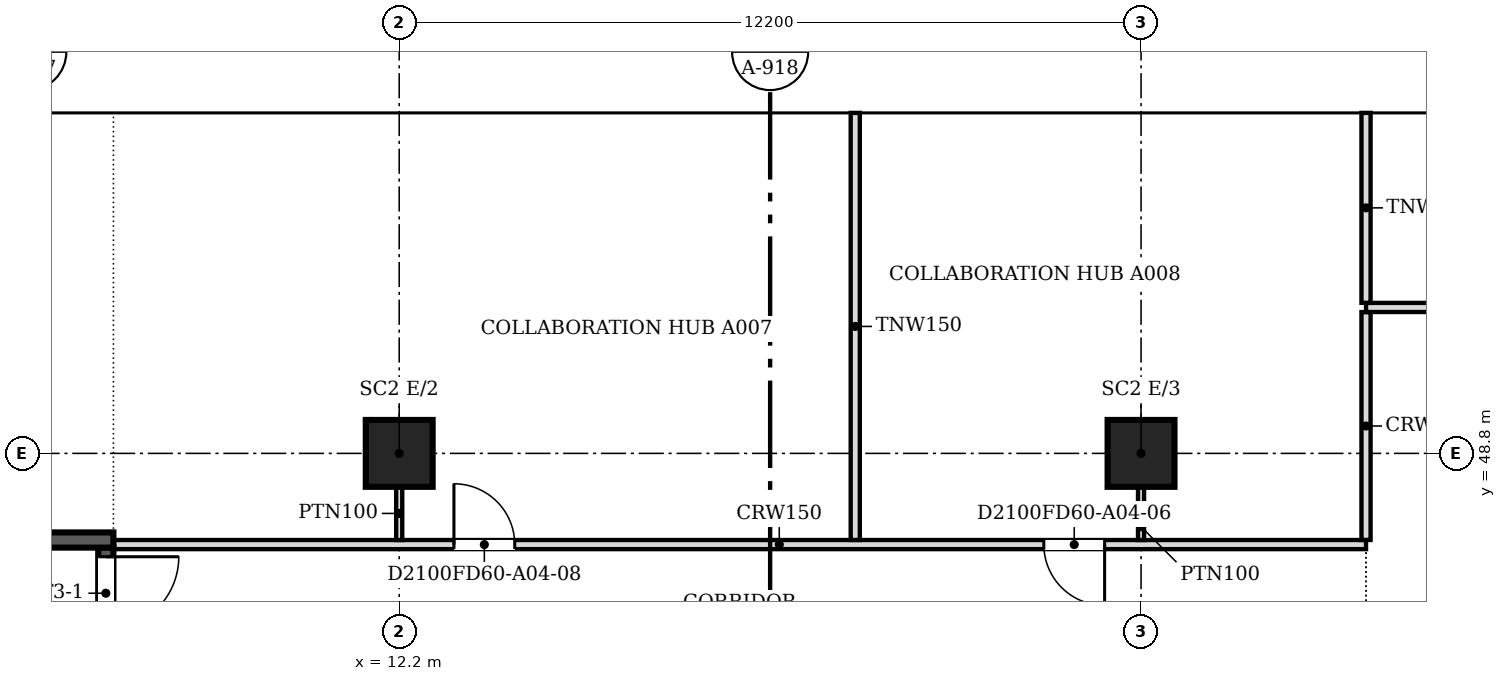
"""IFC4 building model, lengths in metres.
Left out: names, types, materials, properties, quantities, classifications, styles, units other than length and angle.
Written with IfcOpenShell. Run it as: python <this file> out.ifc"""

import sys

from ifc_helpers import new_model, si_unit, direction, frame, frame_2d, origin, origin_2d, place, context, subcontext, project, spatial, polyline, rectangle, outline, extrude, faceted_brep, source, transform, mapped, element, fill, save


model = new_model("IFC4")
c1 = context("Model", 3, precision=1e-05, world=origin(), true_north=direction((0.0, 1.0)))
c2 = subcontext(c1, "Body", "Model", "MODEL_VIEW")
j1 = project(units=[si_unit("LENGTHUNIT", "METRE"), si_unit("PLANEANGLEUNIT", "RADIAN")], contexts=[c1])
p1 = place(None, origin())
s1 = spatial("IfcSite", under=j1, at=p1, CompositionType="ELEMENT")
p2 = place(p1, origin())
s2 = spatial("IfcBuilding", under=s1, at=p2, CompositionType="ELEMENT")
p3 = place(p2, frame((0.0, 0.0, 52.4)))
s3 = spatial("IfcBuildingStorey", under=s2, at=p3, CompositionType="ELEMENT", Elevation=52.4)
for number, where, z_axis, x_axis in (
    (1, (12.2, 48.8, 0.0), (0.0, 0.0, 1.0), (1.0, 0.0, 0.0)),
    (2, (24.4, 48.8, 0.0), (0.0, 0.0, 1.0), (1.0, 0.0, 0.0)),
):
    element("IfcColumn", number, at=place(p3, frame(where, z_axis=z_axis, x_axis=x_axis)), inside=s3, PredefinedType="COLUMN", context=c2, shape_type="SweptSolid", body=[
        extrude(rectangle(XDim=1.1, YDim=1.1, at=origin_2d()), origin(), (0.0, 0.0, 1.0), 3.6),
    ])
m1 = source(origin(), c2, "Body", "SweptSolid", [
    extrude(outline(polyline([(3.05, 0.0), (6.1, 3.8), (3.05, 7.6), (0.0, 3.8), (3.05, 0.0)])), frame((0.0, 0.25, 0.0), z_axis=(0.0, -1.0, 0.0), x_axis=(1.0, 0.0, 0.0)), (0.0, 0.0, 1.0), 0.5),
])
p4 = place(p3, frame((30.5, 54.65, -3.8), z_axis=(0.0, 0.0, 1.0), x_axis=(-1.0, 0.0, 0.0)))
e3 = element("IfcWall", 3, at=p4, inside=s3, PredefinedType="SOLIDWALL", context=c2, shape_type="MappedRepresentation", body=[
    mapped(m1, transform((0.0, 0.0, 0.0), scale=1.0)),
])
m2 = source(origin(), c2, "Body", "SweptSolid", [
    extrude(outline(polyline([(3.05, 0.399), (5.78, 3.8), (3.05, 7.2), (0.321, 3.8), (3.05, 0.399)])), frame((0.0, 0.26, 0.0), z_axis=(0.0, -1.0, 0.0), x_axis=(1.0, 0.0, 0.0)), (0.0, 0.0, 1.0), 0.52),
])
p5 = place(p4, origin())
e4 = element("IfcOpeningElement", 4, at=p5, cuts=e3, PredefinedType="OPENING", context=c2, shape_type="MappedRepresentation", body=[
    mapped(m2, transform((0.0, 0.0, 0.0), scale=1.0)),
])
m3 = source(origin(), c2, "Body", "Brep", [
    faceted_brep([(3.05, -0.25, 0.0), (6.1, -0.25, 3.8), (6.1, -0.25, 3.8), (3.05, -0.25, 7.6), (0.0, -0.25, 3.8), (0.0, 0.25, 3.8), (3.05, 0.25, 7.6), (6.1, 0.25, 3.8), (6.1, 0.25, 3.8), (3.05, 0.25, 0.0)], [[[0, 1, 2, 3, 4]], [[5, 6, 7, 8, 9]], [[9, 8, 1, 0]], [[7, 6, 3, 2]], [[6, 5, 4, 3]], [[5, 9, 0, 4]], [[1, 8, 7, 2]]]),
])
p6 = place(p3, frame((24.4, 54.65, -3.8), z_axis=(0.0, 0.0, 1.0), x_axis=(-1.0, 0.0, 0.0)))
e5 = element("IfcWall", 5, at=p6, inside=s3, PredefinedType="SOLIDWALL", context=c2, shape_type="MappedRepresentation", body=[
    mapped(m3, transform((0.0, 0.0, 0.0), scale=1.0)),
])
p7 = place(p6, origin())
e6 = element("IfcOpeningElement", 6, at=p7, cuts=e5, PredefinedType="OPENING", context=c2, shape_type="MappedRepresentation", body=[
    mapped(m2, transform((0.0, 0.0, 0.0), scale=1.0)),
])
p8 = place(p3, frame((18.3, 54.65, -3.8), z_axis=(0.0, 0.0, 1.0), x_axis=(-1.0, 0.0, 0.0)))
e7 = element("IfcWall", 7, at=p8, inside=s3, PredefinedType="SOLIDWALL", context=c2, shape_type="MappedRepresentation", body=[
    mapped(m1, transform((0.0, 0.0, 0.0), scale=1.0)),
])
p9 = place(p8, origin())
e8 = element("IfcOpeningElement", 8, at=p9, cuts=e7, PredefinedType="OPENING", context=c2, shape_type="MappedRepresentation", body=[
    mapped(m2, transform((0.0, 0.0, 0.0), scale=1.0)),
])
m4 = source(origin(), c2, "Body", "Brep", [
    faceted_brep([(3.05, -0.25, 0.0), (6.053, -0.25, 3.8), (3.05, -0.25, 7.6), (0.0, -0.25, 3.8), (0.0, 0.25, 3.8), (3.05, 0.25, 7.6), (6.007, 0.25, 3.859), (6.007, 0.25, 3.741), (3.05, 0.25, 0.0), (6.053, 0.0, 3.8)], [[[0, 1, 2, 3]], [[4, 5, 6, 7, 8]], [[8, 7, 9, 1, 0]], [[6, 5, 2, 1, 9]], [[5, 4, 3, 2]], [[4, 8, 0, 3]], [[9, 7, 6]]]),
])
p10 = place(p3, frame((12.2, 54.65, -3.8), z_axis=(0.0, 0.0, 1.0), x_axis=(-1.0, 0.0, 0.0)))
e9 = element("IfcWall", 9, at=p10, inside=s3, PredefinedType="SOLIDWALL", context=c2, shape_type="MappedRepresentation", body=[
    mapped(m4, transform((0.0, 0.0, 0.0), scale=1.0)),
])
m5 = source(origin(), c2, "Body", "SweptSolid", [
    extrude(outline(polyline([(3.049, 0.401), (5.735, 3.8), (3.049, 7.199), (0.321, 3.8), (3.049, 0.401)])), frame((0.0, 0.26, 0.0), z_axis=(0.0, -1.0, 0.0), x_axis=(1.0, 0.0, 0.0)), (0.0, 0.0, 1.0), 0.52),
])
p11 = place(p10, origin())
e10 = element("IfcOpeningElement", 10, at=p11, cuts=e9, PredefinedType="OPENING", context=c2, shape_type="MappedRepresentation", body=[
    mapped(m5, transform((0.0, 0.0, 0.0), scale=1.0)),
])
p12 = place(p2, frame((0.0, 0.0, 56.2)))
s4 = spatial("IfcBuildingStorey", under=s2, at=p12, CompositionType="ELEMENT", Elevation=56.2)
m6 = source(origin(), c2, "Body", "SweptSolid", [
    extrude(outline(polyline([(3.05, 0.0), (6.1, 3.8), (3.05, 7.6), (0.0, 3.8), (3.05, 0.0)])), frame((0.0, 0.25, 0.0), z_axis=(0.0, -1.0, 0.0), x_axis=(1.0, 0.0, 0.0)), (0.0, 0.0, 1.0), 0.5),
])
p13 = place(p12, frame((33.55, 54.65, -3.8), z_axis=(0.0, 0.0, 1.0), x_axis=(-1.0, 0.0, 0.0)))
e11 = element("IfcWall", 11, at=p13, inside=s4, PredefinedType="SOLIDWALL", context=c2, shape_type="MappedRepresentation", body=[
    mapped(m6, transform((0.0, 0.0, 0.0), scale=1.0)),
])
m7 = source(origin(), c2, "Body", "SweptSolid", [
    extrude(outline(polyline([(3.05, 0.399), (5.78, 3.8), (3.05, 7.201), (0.321, 3.8), (3.05, 0.399)])), frame((0.0, 0.26, 0.0), z_axis=(0.0, -1.0, 0.0), x_axis=(1.0, 0.0, 0.0)), (0.0, 0.0, 1.0), 0.52),
])
p14 = place(p13, origin())
e12 = element("IfcOpeningElement", 12, at=p14, cuts=e11, PredefinedType="OPENING", context=c2, shape_type="MappedRepresentation", body=[
    mapped(m7, transform((0.0, 0.0, 0.0), scale=1.0)),
])
m8 = source(origin(), c2, "Body", "Brep", [
    faceted_brep([(3.05, -0.25, 0.0), (6.1, -0.25, 3.8), (6.1, -0.25, 3.8), (3.05, -0.25, 7.6), (0.0, -0.25, 3.8), (0.0, 0.25, 3.8), (3.05, 0.25, 7.6), (6.1, 0.25, 3.8), (6.1, 0.25, 3.8), (3.05, 0.25, 0.0)], [[[0, 1, 2, 3, 4]], [[5, 6, 7, 8, 9]], [[9, 8, 1, 0]], [[7, 6, 3, 2]], [[6, 5, 4, 3]], [[5, 9, 0, 4]], [[1, 8, 7, 2]]]),
])
p15 = place(p12, frame((27.45, 54.65, -3.8), z_axis=(0.0, 0.0, 1.0), x_axis=(-1.0, 0.0, 0.0)))
e13 = element("IfcWall", 13, at=p15, inside=s4, PredefinedType="SOLIDWALL", context=c2, shape_type="MappedRepresentation", body=[
    mapped(m8, transform((0.0, 0.0, 0.0), scale=1.0)),
])
p16 = place(p15, origin())
e14 = element("IfcOpeningElement", 14, at=p16, cuts=e13, PredefinedType="OPENING", context=c2, shape_type="MappedRepresentation", body=[
    mapped(m7, transform((0.0, 0.0, 0.0), scale=1.0)),
])
p17 = place(p12, frame((21.35, 54.65, -3.8), z_axis=(0.0, 0.0, 1.0), x_axis=(-1.0, 0.0, 0.0)))
e15 = element("IfcWall", 15, at=p17, inside=s4, PredefinedType="SOLIDWALL", context=c2, shape_type="MappedRepresentation", body=[
    mapped(m6, transform((0.0, 0.0, 0.0), scale=1.0)),
])
p18 = place(p17, origin())
e16 = element("IfcOpeningElement", 16, at=p18, cuts=e15, PredefinedType="OPENING", context=c2, shape_type="MappedRepresentation", body=[
    mapped(m7, transform((0.0, 0.0, 0.0), scale=1.0)),
])
p19 = place(p12, frame((15.25, 54.65, -3.8), z_axis=(0.0, 0.0, 1.0), x_axis=(-1.0, 0.0, 0.0)))
e17 = element("IfcWall", 17, at=p19, inside=s4, PredefinedType="SOLIDWALL", context=c2, shape_type="MappedRepresentation", body=[
    mapped(m6, transform((0.0, 0.0, 0.0), scale=1.0)),
])
p20 = place(p19, origin())
e18 = element("IfcOpeningElement", 18, at=p20, cuts=e17, PredefinedType="OPENING", context=c2, shape_type="MappedRepresentation", body=[
    mapped(m7, transform((0.0, 0.0, 0.0), scale=1.0)),
])
m9 = source(origin(), c2, "Body", "Brep", [
    faceted_brep([(3.003, -0.25, 0.0), (3.05, -0.25, 0.06), (3.05, -0.25, 7.54), (3.003, -0.25, 7.6), (0.0, -0.25, 3.8), (0.0, 0.25, 3.8), (2.957, 0.25, 7.541), (2.957, 0.25, 0.059), (3.003, 0.0, 0.0), (3.003, 0.0, 7.6)], [[[0, 1, 2, 3, 4]], [[5, 6, 7]], [[1, 0, 8]], [[9, 3, 2]], [[6, 5, 4, 3, 9]], [[5, 7, 8, 0, 4]], [[1, 8, 7, 6, 9, 2]]]),
])
p21 = place(p12, frame((9.15, 54.65, -3.8), z_axis=(0.0, 0.0, 1.0), x_axis=(-1.0, 0.0, 0.0)))
e19 = element("IfcWall", 19, at=p21, inside=s4, PredefinedType="SOLIDWALL", context=c2, shape_type="MappedRepresentation", body=[
    mapped(m9, transform((0.0, 0.0, 0.0), scale=1.0)),
])
m10 = source(origin(), c2, "Body", "SweptSolid", [
    extrude(outline(polyline([(2.803, 6.944), (0.319, 3.8), (2.803, 0.656), (2.803, 6.944)])), frame((0.0, 0.26, 0.0), z_axis=(0.0, -1.0, 0.0), x_axis=(1.0, 0.0, 0.0)), (0.0, 0.0, 1.0), 0.52),
])
p22 = place(p21, origin())
e20 = element("IfcOpeningElement", 20, at=p22, cuts=e19, PredefinedType="OPENING", context=c2, shape_type="MappedRepresentation", body=[
    mapped(m10, transform((0.0, 0.0, 0.0), scale=1.0)),
])
p23 = place(p3, frame((3.6, 47.375, 0.0), z_axis=(0.0, 0.0, 1.0), x_axis=(1.0, 0.0, 0.0)))
e21 = element("IfcWall", 21, at=p23, inside=s3, PredefinedType="SOLIDWALL", context=c2, shape_type="SweptSolid", body=[
    extrude(rectangle(XDim=3.9, YDim=0.25, at=frame_2d((1.95, 0.0))), origin(), (0.0, 0.0, 1.0), 3.8),
])
p24 = place(p3, frame((7.375, 47.25, 0.0), z_axis=(0.0, 0.0, 1.0), x_axis=(0.0, -1.0, 0.0)))
e22 = element("IfcWall", 22, at=p24, inside=s3, PredefinedType="SOLIDWALL", context=c2, shape_type="SweptSolid", body=[
    extrude(rectangle(XDim=8.0, YDim=0.25, at=frame_2d((4.0, 0.0))), origin(), (0.0, 0.0, 1.0), 3.8),
])
m11 = source(origin(), c2, "Body", "SweptSolid", [
    extrude(rectangle(XDim=1.2, YDim=2.1, at=frame_2d((0.6, 1.05))), frame((0.0, 0.135, 0.0), z_axis=(0.0, -1.0, 0.0), x_axis=(1.0, 0.0, 0.0)), (0.0, 0.0, 1.0), 0.27),
])
p25 = place(p24, frame((0.15, 0.0, 0.0)))
e23 = element("IfcOpeningElement", 23, at=p25, cuts=e22, PredefinedType="OPENING", context=c2, shape_type="MappedRepresentation", body=[
    mapped(m11, transform((0.0, 0.0, 0.0), scale=1.0)),
])
p26 = place(p3, frame((7.5, 47.3, 0.0), z_axis=(0.0, 0.0, 1.0), x_axis=(1.0, 0.0, 0.0)))
e24 = element("IfcWall", 24, at=p26, inside=s3, PredefinedType="PARTITIONING", context=c2, shape_type="SweptSolid", body=[
    extrude(rectangle(XDim=20.6, YDim=0.15, at=frame_2d((10.3, 0.0))), origin(), (0.0, 0.0, 1.0), 3.067),
])
m12 = source(origin(), c2, "Body", "SweptSolid", [
    extrude(rectangle(XDim=1.0, YDim=2.1, at=frame_2d((0.5, 1.05))), frame((0.0, 0.085, 0.0), z_axis=(0.0, -1.0, 0.0), x_axis=(1.0, 0.0, 0.0)), (0.0, 0.0, 1.0), 0.17),
])
p27 = place(p26, frame((15.301, 0.0, 0.0)))
e25 = element("IfcOpeningElement", 25, at=p27, cuts=e24, PredefinedType="OPENING", context=c2, shape_type="MappedRepresentation", body=[
    mapped(m12, transform((0.0, 0.0, 0.0), scale=1.0)),
])
p28 = place(p26, frame((5.6, 0.0, 0.0)))
e26 = element("IfcOpeningElement", 26, at=p28, cuts=e24, PredefinedType="OPENING", context=c2, shape_type="MappedRepresentation", body=[
    mapped(m12, transform((0.0, 0.0, 0.0), scale=1.0)),
])
p29 = place(p3, frame((19.7, 47.376, 0.0), z_axis=(0.0, 0.0, 1.0), x_axis=(0.0, 1.0, 0.0)))
e27 = element("IfcWall", 27, at=p29, inside=s3, PredefinedType="PARTITIONING", context=c2, shape_type="SweptSolid", body=[
    extrude(rectangle(XDim=7.024, YDim=0.15, at=frame_2d((3.512, 0.0))), origin(), (0.0, 0.0, 1.0), 3.067),
])
p30 = place(p3, frame((28.1, 47.376, 0.0), z_axis=(0.0, 0.0, 1.0), x_axis=(0.0, 1.0, 0.0)))
e28 = element("IfcWall", 28, at=p30, inside=s3, PredefinedType="PARTITIONING", context=c2, shape_type="SweptSolid", body=[
    extrude(rectangle(XDim=3.748, YDim=0.15, at=frame_2d((1.874, 0.0))), origin(), (0.0, 0.0, 1.0), 3.067),
])
for number, where, z_axis, x_axis in (
    (29, (12.2, 48.25, 0.0), (0.0, 0.0, 1.0), (0.0, -1.0, 0.0)),
    (30, (24.4, 48.25, 0.0), (0.0, 0.0, 1.0), (0.0, -1.0, 0.0)),
):
    element("IfcWall", number, at=place(p3, frame(where, z_axis=z_axis, x_axis=x_axis)), inside=s3, PredefinedType="PARTITIONING", context=c2, shape_type="SweptSolid", body=[
        extrude(rectangle(XDim=0.875, YDim=0.1, at=frame_2d((0.438, 0.0))), origin(), (0.0, 0.0, 1.0), 3.067),
    ])
p31 = place(p3, frame((28.1, 51.2, 0.0), z_axis=(0.0, 0.0, 1.0), x_axis=(1.0, 0.0, 0.0)))
e31 = element("IfcWall", 31, at=p31, inside=s3, PredefinedType="PARTITIONING", context=c2, shape_type="SweptSolid", body=[
    extrude(rectangle(XDim=31.438, YDim=0.15, at=frame_2d((15.719, 0.0))), origin(), (0.0, 0.0, 1.0), 3.067),
])
m13 = source(origin(), c2, "Body", "SweptSolid", [
    extrude(rectangle(XDim=0.9, YDim=2.1, at=frame_2d((0.45, 1.05))), frame((0.0, 0.085, 0.0), z_axis=(0.0, -1.0, 0.0), x_axis=(1.0, 0.0, 0.0)), (0.0, 0.0, 1.0), 0.17),
])
p32 = place(p31, frame((4.1, 0.0, 0.0)))
e32 = element("IfcOpeningElement", 32, at=p32, cuts=e31, PredefinedType="OPENING", context=c2, shape_type="MappedRepresentation", body=[
    mapped(m13, transform((0.0, 0.0, 0.0), scale=1.0)),
])
p33 = place(p31, frame((25.951, 0.0, 0.0)))
e33 = element("IfcOpeningElement", 33, at=p33, cuts=e31, PredefinedType="OPENING", context=c2, shape_type="MappedRepresentation", body=[
    mapped(m13, transform((0.0, 0.0, 0.0), scale=1.0)),
])
p34 = place(p31, frame((14.75, 0.0, 0.0)))
e34 = element("IfcOpeningElement", 34, at=p34, cuts=e31, PredefinedType="OPENING", context=c2, shape_type="MappedRepresentation", body=[
    mapped(m13, transform((0.0, 0.0, 0.0), scale=1.0)),
])
p35 = place(p3, frame((28.1, 51.276, 0.0), z_axis=(0.0, 0.0, 1.0), x_axis=(0.0, 1.0, 0.0)))
e35 = element("IfcWall", 35, at=p35, inside=s3, PredefinedType="PARTITIONING", context=c2, shape_type="SweptSolid", body=[
    extrude(rectangle(XDim=3.124, YDim=0.15, at=frame_2d((1.562, 0.0))), origin(), (0.0, 0.0, 1.0), 3.067),
])
m14 = source(origin(), c2, "Body", "SweptSolid", [
    extrude(rectangle(XDim=1.2, YDim=2.1, at=frame_2d((0.6, 1.05))), frame((0.0, 0.025, 0.0), z_axis=(0.0, -1.0, 0.0), x_axis=(1.0, 0.0, 0.0)), (0.0, 0.0, 1.0), 0.05),
])
p36 = place(p25, origin())
e36 = element("IfcDoor", 36, at=p36, inside=s3, OperationType="SINGLE_SWING_LEFT", PredefinedType="DOOR", context=c2, shape_type="MappedRepresentation", body=[
    mapped(m14, transform((0.0, 0.0, 0.0), scale=1.0)),
])
fill(e23, e36)
m15 = source(origin(), c2, "Body", "SweptSolid", [
    extrude(rectangle(XDim=1.0, YDim=2.1, at=frame_2d((0.5, 1.05))), frame((0.0, 0.025, 0.0), z_axis=(0.0, -1.0, 0.0), x_axis=(1.0, 0.0, 0.0)), (0.0, 0.0, 1.0), 0.05),
])
p37 = place(p27, origin())
e37 = element("IfcDoor", 37, at=p37, inside=s3, OperationType="SINGLE_SWING_RIGHT", PredefinedType="DOOR", context=c2, shape_type="MappedRepresentation", body=[
    mapped(m15, transform((0.0, 0.0, 0.0), scale=1.0)),
])
fill(e25, e37)
p38 = place(p28, origin())
e38 = element("IfcDoor", 38, at=p38, inside=s3, OperationType="SINGLE_SWING_LEFT", PredefinedType="DOOR", context=c2, shape_type="MappedRepresentation", body=[
    mapped(m15, transform((0.0, 0.0, 0.0), scale=1.0)),
])
fill(e26, e38)
save(model, sys.argv[1])
